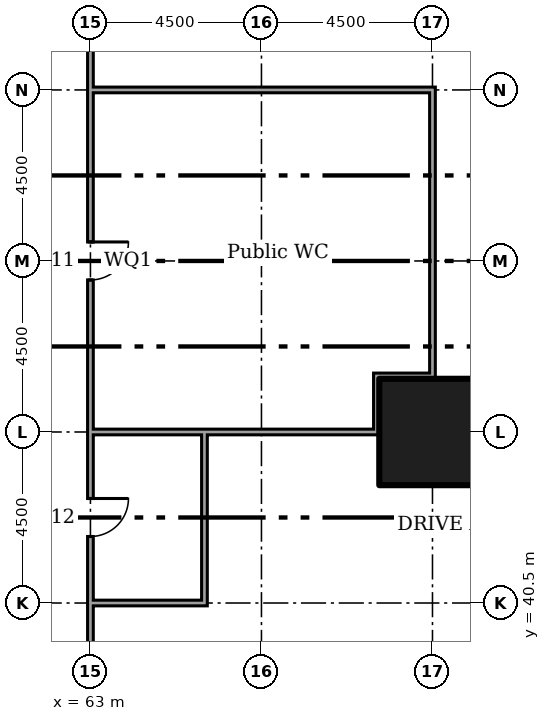
"""IFC4 building model, lengths in metres.
Left out: names, types, materials, properties, quantities, classifications, styles, units other than length and angle.
Written with IfcOpenShell. Run it as: python <this file> out.ifc"""

import sys

from ifc_helpers import new_model, si_unit, direction, frame, frame_2d, origin, origin_2d, place, context, subcontext, project, spatial, rectangle, extrude, element, fill, save


model = new_model("IFC4")
c1 = context("Model", 3, precision=1e-05, world=origin(), true_north=direction((0.0, 1.0)))
c2 = subcontext(c1, "Body", "Model", "MODEL_VIEW")
j1 = project(units=[si_unit("LENGTHUNIT", "METRE"), si_unit("PLANEANGLEUNIT", "RADIAN")], contexts=[c1])
p1 = place(None, origin())
s1 = spatial("IfcSite", under=j1, at=p1, CompositionType="ELEMENT")
p2 = place(p1, origin())
s2 = spatial("IfcBuilding", under=s1, at=p2, CompositionType="ELEMENT")
p3 = place(p2, frame((0.0, 0.0, -4.0)))
s3 = spatial("IfcBuildingStorey", under=s2, at=p3, CompositionType="ELEMENT", Elevation=-4.0)
p4 = place(p3, frame((72.0, 45.0, 0.0)))
e1 = element("IfcColumn", 1, at=p4, inside=s3, PredefinedType="COLUMN", context=c2, shape_type="SweptSolid", body=[
    extrude(rectangle(XDim=2.8, YDim=2.8, at=origin_2d()), origin(), (0.0, 0.0, 1.0), 4.0),
])
p5 = place(p3, frame((63.0, 44.925, 0.0), z_axis=(0.0, 0.0, 1.0), x_axis=(0.0, 1.0, 0.0)))
e2 = element("IfcWall", 2, at=p5, inside=s3, PredefinedType="PARTITIONING", context=c2, shape_type="SweptSolid", body=[
    extrude(rectangle(XDim=9.15, YDim=0.15, at=frame_2d((4.575, 0.0))), origin(), (0.0, 0.0, 1.0), 3.55),
])
p6 = place(p5, frame((4.075, 0.0, 0.0)))
e3 = element("IfcOpeningElement", 3, at=p6, cuts=e2, PredefinedType="OPENING", context=c2, shape_type="SweptSolid", body=[
    extrude(rectangle(XDim=1.0, YDim=2.1, at=frame_2d((0.5, 1.05))), frame((0.0, 0.085, 0.0), z_axis=(0.0, -1.0, 0.0), x_axis=(1.0, 0.0, 0.0)), (0.0, 0.0, 1.0), 0.17),
])
p7 = place(p3, frame((63.0, 40.425, 0.0), z_axis=(0.0, 0.0, 1.0), x_axis=(0.0, 1.0, 0.0)))
e4 = element("IfcWall", 4, at=p7, inside=s3, PredefinedType="PARTITIONING", context=c2, shape_type="SweptSolid", body=[
    extrude(rectangle(XDim=4.575, YDim=0.15, at=frame_2d((2.288, 0.0))), origin(), (0.0, 0.0, 1.0), 3.55),
])
p8 = place(p7, frame((1.825, 0.0, 0.0)))
e5 = element("IfcOpeningElement", 5, at=p8, cuts=e4, PredefinedType="OPENING", context=c2, shape_type="SweptSolid", body=[
    extrude(rectangle(XDim=1.0, YDim=2.1, at=frame_2d((0.5, 1.05))), frame((0.0, 0.085, 0.0), z_axis=(0.0, -1.0, 0.0), x_axis=(1.0, 0.0, 0.0)), (0.0, 0.0, 1.0), 0.17),
])
p9 = place(p3, frame((63.0, 35.925, 0.0), z_axis=(0.0, 0.0, 1.0), x_axis=(0.0, 1.0, 0.0)))
e6 = element("IfcWall", 6, at=p9, inside=s3, PredefinedType="PARTITIONING", context=c2, shape_type="SweptSolid", body=[
    extrude(rectangle(XDim=4.575, YDim=0.15, at=frame_2d((2.288, 0.0))), origin(), (0.0, 0.0, 1.0), 3.55),
])
p10 = place(p3, frame((63.0, 54.0, 0.0), z_axis=(0.0, 0.0, 1.0), x_axis=(0.0, 1.0, 0.0)))
e7 = element("IfcWall", 7, at=p10, inside=s3, PredefinedType="PARTITIONING", context=c2, shape_type="SweptSolid", body=[
    extrude(rectangle(XDim=3.98, YDim=0.15, at=frame_2d((1.99, 0.0))), origin(), (0.0, 0.0, 1.0), 3.55),
])
p11 = place(p3, frame((63.075, 45.0, 0.0)))
e8 = element("IfcWall", 8, at=p11, inside=s3, PredefinedType="PARTITIONING", context=c2, shape_type="SweptSolid", body=[
    extrude(rectangle(XDim=3.0, YDim=0.15, at=frame_2d((1.5, 0.0))), origin(), (0.0, 0.0, 1.0), 3.55),
])
p12 = place(p3, frame((70.525, 44.925, 0.0), z_axis=(0.0, 0.0, 1.0), x_axis=(0.0, 1.0, 0.0)))
e9 = element("IfcWall", 9, at=p12, inside=s3, PredefinedType="PARTITIONING", context=c2, shape_type="SweptSolid", body=[
    extrude(rectangle(XDim=1.625, YDim=0.15, at=frame_2d((0.812, 0.0))), origin(), (0.0, 0.0, 1.0), 3.55),
])
p13 = place(p3, frame((72.0, 46.4, 0.0), z_axis=(0.0, 0.0, 1.0), x_axis=(0.0, 1.0, 0.0)))
e10 = element("IfcWall", 10, at=p13, inside=s3, PredefinedType="PARTITIONING", context=c2, shape_type="SweptSolid", body=[
    extrude(rectangle(XDim=7.675, YDim=0.15, at=frame_2d((3.837, 0.0))), origin(), (0.0, 0.0, 1.0), 3.55),
])
p14 = place(p3, frame((66.0, 45.0, 0.0)))
e11 = element("IfcWall", 11, at=p14, inside=s3, PredefinedType="PARTITIONING", context=c2, shape_type="SweptSolid", body=[
    extrude(rectangle(XDim=4.45, YDim=0.15, at=frame_2d((2.225, 0.0))), origin(), (0.0, 0.0, 1.0), 3.55),
])
p15 = place(p3, frame((70.6, 46.475, 0.0)))
e12 = element("IfcWall", 12, at=p15, inside=s3, PredefinedType="PARTITIONING", context=c2, shape_type="SweptSolid", body=[
    extrude(rectangle(XDim=1.325, YDim=0.15, at=frame_2d((0.663, 0.0))), origin(), (0.0, 0.0, 1.0), 3.55),
])
p16 = place(p3, frame((63.075, 54.0, 0.0)))
e13 = element("IfcWall", 13, at=p16, inside=s3, PredefinedType="PARTITIONING", context=c2, shape_type="SweptSolid", body=[
    extrude(rectangle(XDim=8.85, YDim=0.15, at=frame_2d((4.425, 0.0))), origin(), (0.0, 0.0, 1.0), 3.55),
])
p17 = place(p3, frame((66.0, 40.425, 0.0), z_axis=(0.0, 0.0, 1.0), x_axis=(0.0, 1.0, 0.0)))
e14 = element("IfcWall", 14, at=p17, inside=s3, PredefinedType="PARTITIONING", context=c2, shape_type="SweptSolid", body=[
    extrude(rectangle(XDim=4.5, YDim=0.15, at=frame_2d((2.25, 0.0))), origin(), (0.0, 0.0, 1.0), 3.55),
])
p18 = place(p3, frame((63.075, 40.5, 0.0)))
e15 = element("IfcWall", 15, at=p18, inside=s3, PredefinedType="PARTITIONING", context=c2, shape_type="SweptSolid", body=[
    extrude(rectangle(XDim=2.85, YDim=0.15, at=frame_2d((1.425, 0.0))), origin(), (0.0, 0.0, 1.0), 3.55),
])
p19 = place(p6, frame((1.0, 0.0, 0.0), x_axis=(-1.0, 0.0, 0.0)))
e16 = element("IfcDoor", 16, at=p19, inside=s3, OperationType="SINGLE_SWING_RIGHT", PredefinedType="DOOR", context=c2, shape_type="SweptSolid", body=[
    extrude(rectangle(XDim=1.0, YDim=2.1, at=frame_2d((0.5, 1.05))), frame((0.0, 0.025, 0.0), z_axis=(0.0, -1.0, 0.0), x_axis=(1.0, 0.0, 0.0)), (0.0, 0.0, 1.0), 0.05),
])
fill(e3, e16)
p20 = place(p8, frame((1.0, 0.0, 0.0), x_axis=(-1.0, 0.0, 0.0)))
e17 = element("IfcDoor", 17, at=p20, inside=s3, OperationType="SINGLE_SWING_RIGHT", PredefinedType="DOOR", context=c2, shape_type="SweptSolid", body=[
    extrude(rectangle(XDim=1.0, YDim=2.1, at=frame_2d((0.5, 1.05))), frame((0.0, 0.025, 0.0), z_axis=(0.0, -1.0, 0.0), x_axis=(1.0, 0.0, 0.0)), (0.0, 0.0, 1.0), 0.05),
])
fill(e5, e17)
save(model, sys.argv[1])
